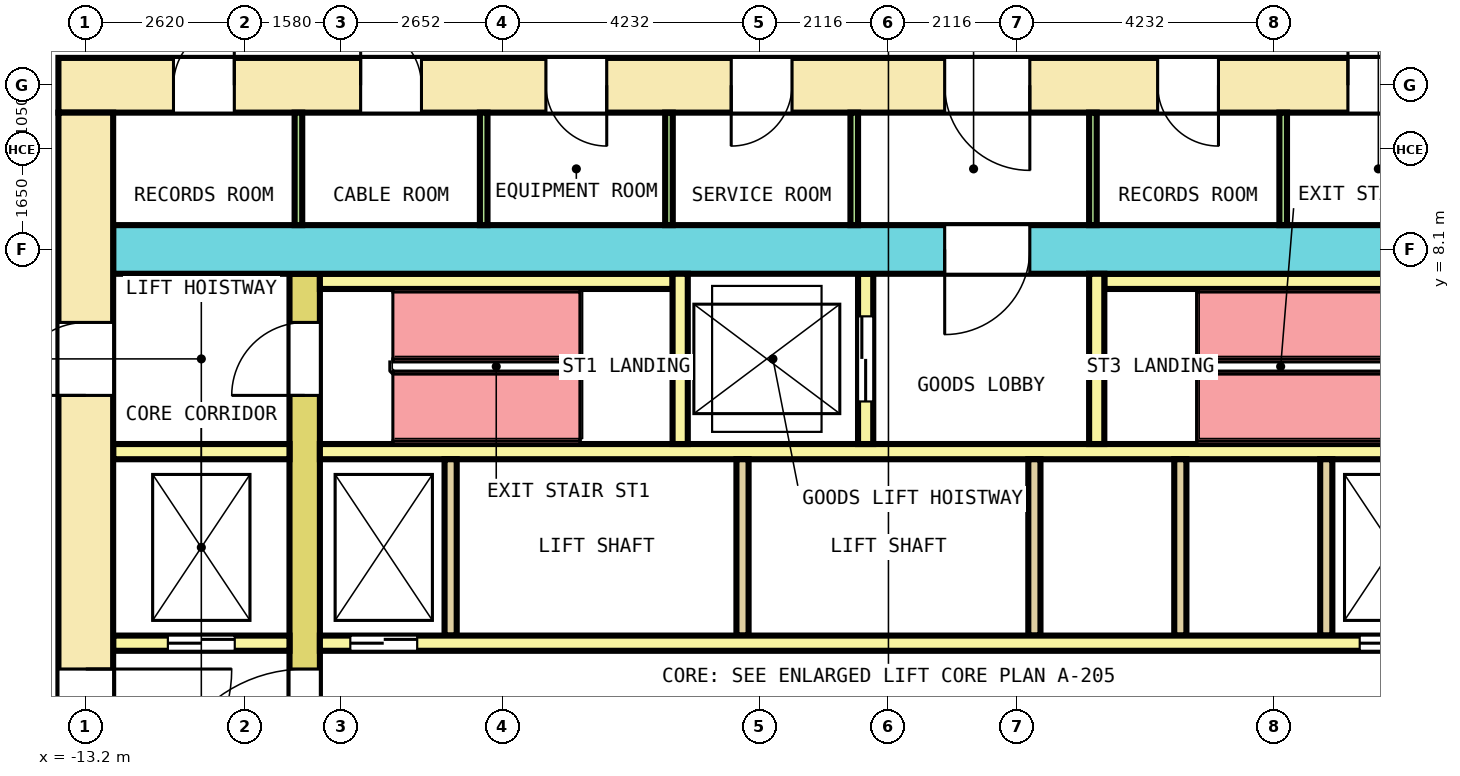
"""IFC4 building model, lengths in metres.
Left out: names, types, materials, properties, quantities, classifications, styles, units other than length and angle.
Written with IfcOpenShell. Run it as: python <this file> out.ifc"""

import sys

from ifc_helpers import new_model, si_unit, direction, frame, frame_2d, origin, place, context, subcontext, project, spatial, rectangle, extrude, element, fill, save


model = new_model("IFC4")
c1 = context("Model", 3, precision=1e-05, world=origin(), true_north=direction((0.0, 1.0)))
c2 = subcontext(c1, "Body", "Model", "MODEL_VIEW")
j1 = project(units=[si_unit("LENGTHUNIT", "METRE"), si_unit("PLANEANGLEUNIT", "RADIAN")], contexts=[c1])
p1 = place(None, origin())
s1 = spatial("IfcSite", under=j1, at=p1, CompositionType="ELEMENT")
p2 = place(p1, origin())
s2 = spatial("IfcBuilding", under=s1, at=p2, CompositionType="ELEMENT")
p3 = place(p2, frame((0.0, 0.0, 14.6)))
s3 = spatial("IfcBuildingStorey", under=s2, at=p3, CompositionType="ELEMENT", Elevation=14.6)
p4 = place(p3, frame((-13.65, 10.8, 0.0), z_axis=(0.0, 0.0, 1.0), x_axis=(1.0, 0.0, 0.0)))
e1 = element("IfcWall", 1, at=p4, inside=s3, PredefinedType="SHEAR", context=c2, shape_type="SweptSolid", body=[
    extrude(rectangle(XDim=27.3, YDim=0.9, at=frame_2d((13.65, 0.0))), origin(), (0.0, 0.0, 1.0), 4.1),
])
p5 = place(p4, frame((1.892, 0.0, 0.0)))
e2 = element("IfcOpeningElement", 2, at=p5, cuts=e1, PredefinedType="OPENING", context=c2, shape_type="SweptSolid", body=[
    extrude(rectangle(XDim=1.0, YDim=2.1, at=frame_2d((0.5, 1.05))), frame((0.0, 0.46, 0.0), z_axis=(0.0, -1.0, 0.0), x_axis=(1.0, 0.0, 0.0)), (0.0, 0.0, 1.0), 0.92),
])
p6 = place(p4, frame((4.97, 0.0, 0.0)))
e3 = element("IfcOpeningElement", 3, at=p6, cuts=e1, PredefinedType="OPENING", context=c2, shape_type="SweptSolid", body=[
    extrude(rectangle(XDim=1.0, YDim=2.1, at=frame_2d((0.5, 1.05))), frame((0.0, 0.46, 0.0), z_axis=(0.0, -1.0, 0.0), x_axis=(1.0, 0.0, 0.0)), (0.0, 0.0, 1.0), 0.92),
])
p7 = place(p4, frame((8.017, 0.0, 0.0)))
e4 = element("IfcOpeningElement", 4, at=p7, cuts=e1, PredefinedType="OPENING", context=c2, shape_type="SweptSolid", body=[
    extrude(rectangle(XDim=1.0, YDim=2.1, at=frame_2d((0.5, 1.05))), frame((0.0, 0.46, 0.0), z_axis=(0.0, -1.0, 0.0), x_axis=(1.0, 0.0, 0.0)), (0.0, 0.0, 1.0), 0.92),
])
p8 = place(p4, frame((11.064, 0.0, 0.0)))
e5 = element("IfcOpeningElement", 5, at=p8, cuts=e1, PredefinedType="OPENING", context=c2, shape_type="SweptSolid", body=[
    extrude(rectangle(XDim=1.0, YDim=2.1, at=frame_2d((0.5, 1.05))), frame((0.0, 0.46, 0.0), z_axis=(0.0, -1.0, 0.0), x_axis=(1.0, 0.0, 0.0)), (0.0, 0.0, 1.0), 0.92),
])
p9 = place(p4, frame((18.077, 0.0, 0.0)))
e6 = element("IfcOpeningElement", 6, at=p9, cuts=e1, PredefinedType="OPENING", context=c2, shape_type="SweptSolid", body=[
    extrude(rectangle(XDim=1.0, YDim=2.1, at=frame_2d((0.5, 1.05))), frame((0.0, 0.46, 0.0), z_axis=(0.0, -1.0, 0.0), x_axis=(1.0, 0.0, 0.0)), (0.0, 0.0, 1.0), 0.92),
])
p10 = place(p4, frame((21.206, 0.0, 0.0)))
e7 = element("IfcOpeningElement", 7, at=p10, cuts=e1, PredefinedType="OPENING", context=c2, shape_type="SweptSolid", body=[
    extrude(rectangle(XDim=1.0, YDim=2.1, at=frame_2d((0.5, 1.05))), frame((0.0, 0.46, 0.0), z_axis=(0.0, -1.0, 0.0), x_axis=(1.0, 0.0, 0.0)), (0.0, 0.0, 1.0), 0.92),
])
p11 = place(p4, frame((24.367, 0.0, 0.0)))
e8 = element("IfcOpeningElement", 8, at=p11, cuts=e1, PredefinedType="OPENING", context=c2, shape_type="SweptSolid", body=[
    extrude(rectangle(XDim=1.0, YDim=2.1, at=frame_2d((0.5, 1.05))), frame((0.0, 0.46, 0.0), z_axis=(0.0, -1.0, 0.0), x_axis=(1.0, 0.0, 0.0)), (0.0, 0.0, 1.0), 0.92),
])
p12 = place(p4, frame((14.575, 0.0, 0.0)))
e9 = element("IfcOpeningElement", 9, at=p12, cuts=e1, PredefinedType="OPENING", context=c2, shape_type="SweptSolid", body=[
    extrude(rectangle(XDim=1.4, YDim=2.1, at=frame_2d((0.7, 1.05))), frame((0.0, 0.46, 0.0), z_axis=(0.0, -1.0, 0.0), x_axis=(1.0, 0.0, 0.0)), (0.0, 0.0, 1.0), 0.92),
])
p13 = place(p3, frame((-13.2, -10.35, 0.0), z_axis=(0.0, 0.0, 1.0), x_axis=(0.0, 1.0, 0.0)))
e10 = element("IfcWall", 10, at=p13, inside=s3, PredefinedType="SHEAR", context=c2, shape_type="SweptSolid", body=[
    extrude(rectangle(XDim=20.7, YDim=0.9, at=frame_2d((10.35, 0.0))), origin(), (0.0, 0.0, 1.0), 4.1),
])
p14 = place(p13, frame((9.15, 0.0, 0.0)))
e11 = element("IfcOpeningElement", 11, at=p14, cuts=e10, PredefinedType="OPENING", context=c2, shape_type="SweptSolid", body=[
    extrude(rectangle(XDim=2.4, YDim=2.1, at=frame_2d((1.2, 1.05))), frame((0.0, 0.46, 0.0), z_axis=(0.0, -1.0, 0.0), x_axis=(1.0, 0.0, 0.0)), (0.0, 0.0, 1.0), 0.92),
])
p15 = place(p13, frame((16.05, 0.0, 0.0)))
e12 = element("IfcOpeningElement", 12, at=p15, cuts=e10, PredefinedType="OPENING", context=c2, shape_type="SweptSolid", body=[
    extrude(rectangle(XDim=1.2, YDim=2.1, at=frame_2d((0.6, 1.05))), frame((0.0, 0.46, 0.0), z_axis=(0.0, -1.0, 0.0), x_axis=(1.0, 0.0, 0.0)), (0.0, 0.0, 1.0), 0.92),
])
p16 = place(p13, frame((3.45, 0.0, 0.0)))
e13 = element("IfcOpeningElement", 13, at=p16, cuts=e10, PredefinedType="OPENING", context=c2, shape_type="SweptSolid", body=[
    extrude(rectangle(XDim=1.2, YDim=2.1, at=frame_2d((0.6, 1.05))), frame((0.0, 0.46, 0.0), z_axis=(0.0, -1.0, 0.0), x_axis=(1.0, 0.0, 0.0)), (0.0, 0.0, 1.0), 0.92),
])
p17 = place(p3, frame((-12.75, 8.1, 0.0), z_axis=(0.0, 0.0, 1.0), x_axis=(1.0, 0.0, 0.0)))
e14 = element("IfcWall", 14, at=p17, inside=s3, PredefinedType="SHEAR", context=c2, shape_type="SweptSolid", body=[
    extrude(rectangle(XDim=25.5, YDim=0.8, at=frame_2d((12.75, 0.0))), origin(), (0.0, 0.0, 1.0), 4.1),
])
p18 = place(p17, frame((13.675, 0.0, 0.0)))
e15 = element("IfcOpeningElement", 15, at=p18, cuts=e14, PredefinedType="OPENING", context=c2, shape_type="SweptSolid", body=[
    extrude(rectangle(XDim=1.4, YDim=2.1, at=frame_2d((0.7, 1.05))), frame((0.0, 0.41, 0.0), z_axis=(0.0, -1.0, 0.0), x_axis=(1.0, 0.0, 0.0)), (0.0, 0.0, 1.0), 0.82),
])
p19 = place(p3, frame((-9.6, -7.7, 0.0), z_axis=(0.0, 0.0, 1.0), x_axis=(0.0, 1.0, 0.0)))
e16 = element("IfcWall", 16, at=p19, inside=s3, PredefinedType="SHEAR", context=c2, shape_type="SweptSolid", body=[
    extrude(rectangle(XDim=15.4, YDim=0.5, at=frame_2d((7.7, 0.0))), origin(), (0.0, 0.0, 1.0), 4.1),
])
p20 = place(p19, frame((6.5, 0.0, 0.0)))
e17 = element("IfcOpeningElement", 17, at=p20, cuts=e16, PredefinedType="OPENING", context=c2, shape_type="SweptSolid", body=[
    extrude(rectangle(XDim=2.4, YDim=2.1, at=frame_2d((1.2, 1.05))), frame((0.0, 0.26, 0.0), z_axis=(0.0, -1.0, 0.0), x_axis=(1.0, 0.0, 0.0)), (0.0, 0.0, 1.0), 0.52),
])
p21 = place(p19, frame((13.4, 0.0, 0.0)))
e18 = element("IfcOpeningElement", 18, at=p21, cuts=e16, PredefinedType="OPENING", context=c2, shape_type="SweptSolid", body=[
    extrude(rectangle(XDim=1.2, YDim=2.1, at=frame_2d((0.6, 1.05))), frame((0.0, 0.26, 0.0), z_axis=(0.0, -1.0, 0.0), x_axis=(1.0, 0.0, 0.0)), (0.0, 0.0, 1.0), 0.52),
])
p22 = place(p19, frame((0.8, 0.0, 0.0)))
e19 = element("IfcOpeningElement", 19, at=p22, cuts=e16, PredefinedType="OPENING", context=c2, shape_type="SweptSolid", body=[
    extrude(rectangle(XDim=1.2, YDim=2.1, at=frame_2d((0.6, 1.05))), frame((0.0, 0.26, 0.0), z_axis=(0.0, -1.0, 0.0), x_axis=(1.0, 0.0, 0.0)), (0.0, 0.0, 1.0), 0.52),
])
p23 = place(p3, frame((-12.75, 1.625, 0.0), z_axis=(0.0, 0.0, 1.0), x_axis=(1.0, 0.0, 0.0)))
e20 = element("IfcWall", 20, at=p23, inside=s3, PredefinedType="SOLIDWALL", context=c2, shape_type="SweptSolid", body=[
    extrude(rectangle(XDim=2.9, YDim=0.25, at=frame_2d((1.45, 0.0))), origin(), (0.0, 0.0, 1.0), 4.1),
])
p24 = place(p23, frame((0.9, 0.0, 0.0)))
e21 = element("IfcOpeningElement", 21, at=p24, cuts=e20, PredefinedType="OPENING", context=c2, shape_type="SweptSolid", body=[
    extrude(rectangle(XDim=1.1, YDim=2.1, at=frame_2d((0.55, 1.05))), frame((0.0, 0.135, 0.0), z_axis=(0.0, -1.0, 0.0), x_axis=(1.0, 0.0, 0.0)), (0.0, 0.0, 1.0), 0.27),
])
p25 = place(p3, frame((-9.35, 1.625, 0.0), z_axis=(0.0, 0.0, 1.0), x_axis=(1.0, 0.0, 0.0)))
e22 = element("IfcWall", 22, at=p25, inside=s3, PredefinedType="SOLIDWALL", context=c2, shape_type="SweptSolid", body=[
    extrude(rectangle(XDim=18.7, YDim=0.25, at=frame_2d((9.35, 0.0))), origin(), (0.0, 0.0, 1.0), 4.1),
])
p26 = place(p25, frame((0.5, 0.0, 0.0)))
e23 = element("IfcOpeningElement", 23, at=p26, cuts=e22, PredefinedType="OPENING", context=c2, shape_type="SweptSolid", body=[
    extrude(rectangle(XDim=1.1, YDim=2.1, at=frame_2d((0.55, 1.05))), frame((0.0, 0.135, 0.0), z_axis=(0.0, -1.0, 0.0), x_axis=(1.0, 0.0, 0.0)), (0.0, 0.0, 1.0), 0.27),
])
p27 = place(p25, frame((17.1, 0.0, 0.0)))
e24 = element("IfcOpeningElement", 24, at=p27, cuts=e22, PredefinedType="OPENING", context=c2, shape_type="SweptSolid", body=[
    extrude(rectangle(XDim=1.1, YDim=2.1, at=frame_2d((0.55, 1.05))), frame((0.0, 0.135, 0.0), z_axis=(0.0, -1.0, 0.0), x_axis=(1.0, 0.0, 0.0)), (0.0, 0.0, 1.0), 0.27),
])
p28 = place(p3, frame((-12.75, 4.775, 0.0), z_axis=(0.0, 0.0, 1.0), x_axis=(1.0, 0.0, 0.0)))
e25 = element("IfcWall", 25, at=p28, inside=s3, PredefinedType="SOLIDWALL", context=c2, shape_type="SweptSolid", body=[
    extrude(rectangle(XDim=2.9, YDim=0.25, at=frame_2d((1.45, 0.0))), origin(), (0.0, 0.0, 1.0), 4.1),
])
p29 = place(p3, frame((-9.35, 4.775, 0.0), z_axis=(0.0, 0.0, 1.0), x_axis=(1.0, 0.0, 0.0)))
e26 = element("IfcWall", 26, at=p29, inside=s3, PredefinedType="SOLIDWALL", context=c2, shape_type="SweptSolid", body=[
    extrude(rectangle(XDim=18.7, YDim=0.25, at=frame_2d((9.35, 0.0))), origin(), (0.0, 0.0, 1.0), 4.1),
])
for number, where, z_axis, x_axis in (
    (27, (-7.2, 1.75, 0.0), (0.0, 0.0, 1.0), (0.0, 1.0, 0.0)),
    (28, (-2.4, 1.75, 0.0), (0.0, 0.0, 1.0), (0.0, 1.0, 0.0)),
    (29, (2.4, 1.75, 0.0), (0.0, 0.0, 1.0), (0.0, 1.0, 0.0)),
    (30, (4.8, 1.75, 0.0), (0.0, 0.0, 1.0), (0.0, 1.0, 0.0)),
    (31, (7.2, 1.75, 0.0), (0.0, 0.0, 1.0), (0.0, 1.0, 0.0)),
):
    element("IfcWall", number, at=place(p3, frame(where, z_axis=z_axis, x_axis=x_axis)), inside=s3, PredefinedType="SOLIDWALL", context=c2, shape_type="SweptSolid", body=[
        extrude(rectangle(XDim=2.9, YDim=0.2, at=frame_2d((1.45, 0.0))), origin(), (0.0, 0.0, 1.0), 4.1),
    ])
for number, where, z_axis, x_axis in (
    (32, (-9.35, 7.575, 0.0), (0.0, 0.0, 1.0), (1.0, 0.0, 0.0)),
    (33, (3.55, 7.575, 0.0), (0.0, 0.0, 1.0), (1.0, 0.0, 0.0)),
):
    element("IfcWall", number, at=place(p3, frame(where, z_axis=z_axis, x_axis=x_axis)), inside=s3, PredefinedType="SOLIDWALL", context=c2, shape_type="SweptSolid", body=[
        extrude(rectangle(XDim=5.8, YDim=0.25, at=frame_2d((2.9, 0.0))), origin(), (0.0, 0.0, 1.0), 4.1),
    ])
p30 = place(p3, frame((-3.425, 4.9, 0.0), z_axis=(0.0, 0.0, 1.0), x_axis=(0.0, 1.0, 0.0)))
e34 = element("IfcWall", 34, at=p30, inside=s3, PredefinedType="SOLIDWALL", context=c2, shape_type="SweptSolid", body=[
    extrude(rectangle(XDim=2.8, YDim=0.25, at=frame_2d((1.4, 0.0))), origin(), (0.0, 0.0, 1.0), 4.1),
])
p31 = place(p3, frame((-0.375, 4.9, 0.0), z_axis=(0.0, 0.0, 1.0), x_axis=(0.0, 1.0, 0.0)))
e35 = element("IfcWall", 35, at=p31, inside=s3, PredefinedType="SOLIDWALL", context=c2, shape_type="SweptSolid", body=[
    extrude(rectangle(XDim=2.8, YDim=0.25, at=frame_2d((1.4, 0.0))), origin(), (0.0, 0.0, 1.0), 4.1),
])
p32 = place(p31, frame((0.7, 0.0, 0.0)))
e36 = element("IfcOpeningElement", 36, at=p32, cuts=e35, PredefinedType="OPENING", context=c2, shape_type="SweptSolid", body=[
    extrude(rectangle(XDim=1.4, YDim=2.1, at=frame_2d((0.7, 1.05))), frame((0.0, 0.135, 0.0), z_axis=(0.0, -1.0, 0.0), x_axis=(1.0, 0.0, 0.0)), (0.0, 0.0, 1.0), 0.27),
])
p33 = place(p3, frame((3.425, 4.9, 0.0), z_axis=(0.0, 0.0, 1.0), x_axis=(0.0, 1.0, 0.0)))
e37 = element("IfcWall", 37, at=p33, inside=s3, PredefinedType="SOLIDWALL", context=c2, shape_type="SweptSolid", body=[
    extrude(rectangle(XDim=2.8, YDim=0.25, at=frame_2d((1.4, 0.0))), origin(), (0.0, 0.0, 1.0), 4.1),
])
for number, where, z_axis, x_axis in (
    (38, (-9.703, 8.5, 0.0), (0.0, 0.0, 1.0), (0.0, 1.0, 0.0)),
    (39, (-6.656, 8.5, 0.0), (0.0, 0.0, 1.0), (0.0, 1.0, 0.0)),
    (40, (-3.609, 8.5, 0.0), (0.0, 0.0, 1.0), (0.0, 1.0, 0.0)),
    (41, (-0.562, 8.5, 0.0), (0.0, 0.0, 1.0), (0.0, 1.0, 0.0)),
    (42, (3.363, 8.5, 0.0), (0.0, 0.0, 1.0), (0.0, 1.0, 0.0)),
    (43, (6.492, 8.5, 0.0), (0.0, 0.0, 1.0), (0.0, 1.0, 0.0)),
):
    element("IfcWall", number, at=place(p3, frame(where, z_axis=z_axis, x_axis=x_axis)), inside=s3, PredefinedType="PARTITIONING", context=c2, shape_type="SweptSolid", body=[
        extrude(rectangle(XDim=1.85, YDim=0.125, at=frame_2d((0.925, 0.0))), origin(), (0.0, 0.0, 1.0), 4.1),
    ])
p34 = place(p24, origin())
e44 = element("IfcDoor", 44, at=p34, inside=s3, OperationType="DOUBLE_DOOR_SLIDING", PredefinedType="DOOR", context=c2, shape_type="SweptSolid", body=[
    extrude(rectangle(XDim=1.1, YDim=2.1, at=frame_2d((0.55, 1.05))), frame((0.0, 0.075, 0.0), z_axis=(0.0, -1.0, 0.0), x_axis=(1.0, 0.0, 0.0)), (0.0, 0.0, 1.0), 0.15),
])
fill(e21, e44)
p35 = place(p26, origin())
e45 = element("IfcDoor", 45, at=p35, inside=s3, OperationType="DOUBLE_DOOR_SLIDING", PredefinedType="DOOR", context=c2, shape_type="SweptSolid", body=[
    extrude(rectangle(XDim=1.1, YDim=2.1, at=frame_2d((0.55, 1.05))), frame((0.0, 0.075, 0.0), z_axis=(0.0, -1.0, 0.0), x_axis=(1.0, 0.0, 0.0)), (0.0, 0.0, 1.0), 0.15),
])
fill(e23, e45)
p36 = place(p27, origin())
e46 = element("IfcDoor", 46, at=p36, inside=s3, OperationType="DOUBLE_DOOR_SLIDING", PredefinedType="DOOR", context=c2, shape_type="SweptSolid", body=[
    extrude(rectangle(XDim=1.1, YDim=2.1, at=frame_2d((0.55, 1.05))), frame((0.0, 0.075, 0.0), z_axis=(0.0, -1.0, 0.0), x_axis=(1.0, 0.0, 0.0)), (0.0, 0.0, 1.0), 0.15),
])
fill(e24, e46)
p37 = place(p32, origin())
e47 = element("IfcDoor", 47, at=p37, inside=s3, OperationType="DOUBLE_DOOR_SLIDING", PredefinedType="DOOR", context=c2, shape_type="SweptSolid", body=[
    extrude(rectangle(XDim=1.4, YDim=2.1, at=frame_2d((0.7, 1.05))), frame((0.0, 0.075, 0.0), z_axis=(0.0, -1.0, 0.0), x_axis=(1.0, 0.0, 0.0)), (0.0, 0.0, 1.0), 0.15),
])
fill(e36, e47)
p38 = place(p20, origin())
e48 = element("IfcDoor", 48, at=p38, inside=s3, OperationType="DOUBLE_DOOR_SINGLE_SWING", PredefinedType="DOOR", context=c2, shape_type="SweptSolid", body=[
    extrude(rectangle(XDim=2.4, YDim=2.1, at=frame_2d((1.2, 1.05))), frame((0.0, 0.2, 0.0), z_axis=(0.0, -1.0, 0.0), x_axis=(1.0, 0.0, 0.0)), (0.0, 0.0, 1.0), 0.4),
])
fill(e17, e48)
p39 = place(p14, origin())
e49 = element("IfcDoor", 49, at=p39, inside=s3, OperationType="DOUBLE_DOOR_SINGLE_SWING", PredefinedType="DOOR", context=c2, shape_type="SweptSolid", body=[
    extrude(rectangle(XDim=2.4, YDim=2.1, at=frame_2d((1.2, 1.05))), frame((0.0, 0.3, 0.0), z_axis=(0.0, -1.0, 0.0), x_axis=(1.0, 0.0, 0.0)), (0.0, 0.0, 1.0), 0.6),
])
fill(e11, e49)
p40 = place(p21, origin())
e50 = element("IfcDoor", 50, at=p40, inside=s3, OperationType="SINGLE_SWING_LEFT", PredefinedType="DOOR", context=c2, shape_type="SweptSolid", body=[
    extrude(rectangle(XDim=1.2, YDim=2.1, at=frame_2d((0.6, 1.05))), frame((0.0, 0.2, 0.0), z_axis=(0.0, -1.0, 0.0), x_axis=(1.0, 0.0, 0.0)), (0.0, 0.0, 1.0), 0.4),
])
fill(e18, e50)
p41 = place(p15, origin())
e51 = element("IfcDoor", 51, at=p41, inside=s3, OperationType="SINGLE_SWING_RIGHT", PredefinedType="DOOR", context=c2, shape_type="SweptSolid", body=[
    extrude(rectangle(XDim=1.2, YDim=2.1, at=frame_2d((0.6, 1.05))), frame((0.0, 0.3, 0.0), z_axis=(0.0, -1.0, 0.0), x_axis=(1.0, 0.0, 0.0)), (0.0, 0.0, 1.0), 0.6),
])
fill(e12, e51)
p42 = place(p18, origin())
e52 = element("IfcDoor", 52, at=p42, inside=s3, OperationType="DOUBLE_DOOR_SINGLE_SWING", PredefinedType="DOOR", context=c2, shape_type="SweptSolid", body=[
    extrude(rectangle(XDim=1.4, YDim=2.1, at=frame_2d((0.7, 1.05))), frame((0.0, 0.3, 0.0), z_axis=(0.0, -1.0, 0.0), x_axis=(1.0, 0.0, 0.0)), (0.0, 0.0, 1.0), 0.6),
])
fill(e15, e52)
p43 = place(p5, origin())
e53 = element("IfcDoor", 53, at=p43, inside=s3, OperationType="SINGLE_SWING_LEFT", PredefinedType="DOOR", context=c2, shape_type="SweptSolid", body=[
    extrude(rectangle(XDim=1.0, YDim=2.1, at=frame_2d((0.5, 1.05))), frame((0.0, 0.3, 0.0), z_axis=(0.0, -1.0, 0.0), x_axis=(1.0, 0.0, 0.0)), (0.0, 0.0, 1.0), 0.6),
])
fill(e2, e53)
p44 = place(p6, origin())
e54 = element("IfcDoor", 54, at=p44, inside=s3, OperationType="SINGLE_SWING_RIGHT", PredefinedType="DOOR", context=c2, shape_type="SweptSolid", body=[
    extrude(rectangle(XDim=1.0, YDim=2.1, at=frame_2d((0.5, 1.05))), frame((0.0, 0.3, 0.0), z_axis=(0.0, -1.0, 0.0), x_axis=(1.0, 0.0, 0.0)), (0.0, 0.0, 1.0), 0.6),
])
fill(e3, e54)
p45 = place(p7, origin())
e55 = element("IfcDoor", 55, at=p45, inside=s3, OperationType="SINGLE_SWING_LEFT", PredefinedType="DOOR", context=c2, shape_type="SweptSolid", body=[
    extrude(rectangle(XDim=1.0, YDim=2.1, at=frame_2d((0.5, 1.05))), frame((0.0, 0.3, 0.0), z_axis=(0.0, -1.0, 0.0), x_axis=(1.0, 0.0, 0.0)), (0.0, 0.0, 1.0), 0.6),
])
fill(e4, e55)
p46 = place(p8, origin())
e56 = element("IfcDoor", 56, at=p46, inside=s3, OperationType="SINGLE_SWING_RIGHT", PredefinedType="DOOR", context=c2, shape_type="SweptSolid", body=[
    extrude(rectangle(XDim=1.0, YDim=2.1, at=frame_2d((0.5, 1.05))), frame((0.0, 0.3, 0.0), z_axis=(0.0, -1.0, 0.0), x_axis=(1.0, 0.0, 0.0)), (0.0, 0.0, 1.0), 0.6),
])
fill(e5, e56)
p47 = place(p9, origin())
e57 = element("IfcDoor", 57, at=p47, inside=s3, OperationType="SINGLE_SWING_LEFT", PredefinedType="DOOR", context=c2, shape_type="SweptSolid", body=[
    extrude(rectangle(XDim=1.0, YDim=2.1, at=frame_2d((0.5, 1.05))), frame((0.0, 0.3, 0.0), z_axis=(0.0, -1.0, 0.0), x_axis=(1.0, 0.0, 0.0)), (0.0, 0.0, 1.0), 0.6),
])
fill(e6, e57)
p48 = place(p10, origin())
e58 = element("IfcDoor", 58, at=p48, inside=s3, OperationType="SINGLE_SWING_RIGHT", PredefinedType="DOOR", context=c2, shape_type="SweptSolid", body=[
    extrude(rectangle(XDim=1.0, YDim=2.1, at=frame_2d((0.5, 1.05))), frame((0.0, 0.3, 0.0), z_axis=(0.0, -1.0, 0.0), x_axis=(1.0, 0.0, 0.0)), (0.0, 0.0, 1.0), 0.6),
])
fill(e7, e58)
p49 = place(p12, origin())
e59 = element("IfcDoor", 59, at=p49, inside=s3, OperationType="DOUBLE_DOOR_SINGLE_SWING", PredefinedType="DOOR", context=c2, shape_type="SweptSolid", body=[
    extrude(rectangle(XDim=1.4, YDim=2.1, at=frame_2d((0.7, 1.05))), frame((0.0, 0.3, 0.0), z_axis=(0.0, -1.0, 0.0), x_axis=(1.0, 0.0, 0.0)), (0.0, 0.0, 1.0), 0.6),
])
fill(e9, e59)
save(model, sys.argv[1])
